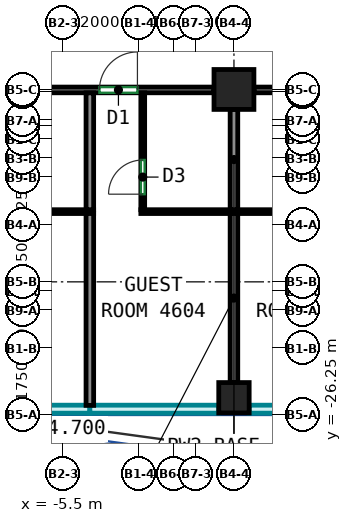
"""IFC4 building model, lengths in metres.
Left out: names, types, materials, properties, quantities, classifications, styles, units other than length and angle.
Written with IfcOpenShell. Run it as: python <this file> out.ifc"""

import sys

from ifc_helpers import new_model, si_unit, direction, frame, frame_2d, origin, origin_2d, place, context, subcontext, project, spatial, rectangle, extrude, source, transform, mapped, element, fill, save


model = new_model("IFC4")
c1 = context("Model", 3, precision=1e-05, world=origin(), true_north=direction((0.0, 1.0)))
c2 = subcontext(c1, "Body", "Model", "MODEL_VIEW")
j1 = project(units=[si_unit("LENGTHUNIT", "METRE"), si_unit("PLANEANGLEUNIT", "RADIAN")], contexts=[c1])
p1 = place(None, origin())
s1 = spatial("IfcSite", under=j1, at=p1, CompositionType="ELEMENT")
p2 = place(p1, origin())
s2 = spatial("IfcBuilding", under=s1, at=p2, CompositionType="ELEMENT")
p3 = place(p2, frame((0.0, 0.0, 192.3)))
s3 = spatial("IfcBuildingStorey", under=s2, at=p3, CompositionType="ELEMENT", Elevation=192.3)
m1 = source(origin(), c2, "Body", "SweptSolid", [
    extrude(rectangle(XDim=0.8, YDim=0.8, at=origin_2d()), origin(), (0.0, 0.0, 1.0), 3.0),
])
p4 = place(p3, frame((-1.0, -25.8, 0.0), z_axis=(0.0, 0.0, 1.0), x_axis=(1.0, 0.0, 0.0)))
e1 = element("IfcColumn", 1, at=p4, inside=s3, PredefinedType="COLUMN", context=c2, shape_type="MappedRepresentation", body=[
    mapped(m1, transform((0.0, 0.0, 0.0))),
])
m2 = source(origin(), c2, "Body", "SweptSolid", [
    extrude(rectangle(XDim=1.05, YDim=1.05, at=origin_2d()), origin(), (0.0, 0.0, 1.0), 3.0),
])
p5 = place(p3, frame((-1.0, -17.688, 0.0), z_axis=(0.0, 0.0, 1.0), x_axis=(1.0, 0.0, 0.0)))
e2 = element("IfcColumn", 2, at=p5, inside=s3, PredefinedType="COLUMN", context=c2, shape_type="MappedRepresentation", body=[
    mapped(m2, transform((0.0, 0.0, 0.0))),
])
p6 = place(p3, frame((-8.058, -17.7, 0.0), z_axis=(0.0, 0.0, 1.0), x_axis=(1.0, 0.0, 0.0)))
e3 = element("IfcWall", 3, at=p6, inside=s3, PredefinedType="PARTITIONING", context=c2, shape_type="SweptSolid", body=[
    extrude(rectangle(XDim=6.533, YDim=0.15, at=frame_2d((3.267, 0.0))), origin(), (0.0, 0.0, 1.0), 2.4),
])
p7 = place(p6, frame((3.518, 0.0, 0.0)))
e4 = element("IfcOpeningElement", 4, at=p7, cuts=e3, PredefinedType="OPENING", context=c2, shape_type="SweptSolid", body=[
    extrude(rectangle(XDim=1.0, YDim=2.1, at=frame_2d((0.5, 1.05))), frame((0.0, 0.085, 0.0), z_axis=(0.0, -1.0, 0.0), x_axis=(1.0, 0.0, 0.0)), (0.0, 0.0, 1.0), 0.17),
])
p8 = place(p3, frame((-0.475, -17.7, 0.0), z_axis=(0.0, 0.0, 1.0), x_axis=(1.0, 0.0, 0.0)))
e5 = element("IfcWall", 5, at=p8, inside=s3, PredefinedType="PARTITIONING", context=c2, shape_type="SweptSolid", body=[
    extrude(rectangle(XDim=6.533, YDim=0.15, at=frame_2d((3.267, 0.0))), origin(), (0.0, 0.0, 1.0), 2.4),
])
p9 = place(p8, frame((2.147, 0.0, 0.0)))
e6 = element("IfcOpeningElement", 6, at=p9, cuts=e5, PredefinedType="OPENING", context=c2, shape_type="SweptSolid", body=[
    extrude(rectangle(XDim=1.0, YDim=2.1, at=frame_2d((0.5, 1.05))), frame((0.0, 0.085, 0.0), z_axis=(0.0, -1.0, 0.0), x_axis=(1.0, 0.0, 0.0)), (0.0, 0.0, 1.0), 0.17),
])
p10 = place(p8, frame((3.468, 0.0, 0.0)))
e7 = element("IfcOpeningElement", 7, at=p10, cuts=e5, PredefinedType="OPENING", context=c2, shape_type="SweptSolid", body=[
    extrude(rectangle(XDim=1.0, YDim=2.1, at=frame_2d((0.5, 1.05))), frame((0.0, 0.085, 0.0), z_axis=(0.0, -1.0, 0.0), x_axis=(1.0, 0.0, 0.0)), (0.0, 0.0, 1.0), 0.17),
])
p11 = place(p3, frame((-7.242, -20.902, 0.0), z_axis=(0.0, 0.0, 1.0), x_axis=(1.0, 0.0, 0.0)))
e8 = element("IfcWall", 8, at=p11, inside=s3, PredefinedType="PARTITIONING", context=c2, shape_type="SweptSolid", body=[
    extrude(rectangle(XDim=2.55, YDim=0.1, at=frame_2d((1.275, 0.0))), origin(), (0.0, 0.0, 1.0), 3.0),
])
p12 = place(p3, frame((-4.792, -26.0, 0.0), z_axis=(0.0, 0.0, 1.0), x_axis=(0.0, 1.0, 0.0)))
e9 = element("IfcWall", 9, at=p12, inside=s3, PredefinedType="PARTITIONING", context=c2, shape_type="SweptSolid", body=[
    extrude(rectangle(XDim=5.048, YDim=0.2, at=frame_2d((2.524, 0.0))), origin(), (0.0, 0.0, 1.0), 3.0),
])
p13 = place(p3, frame((-4.792, -20.852, 0.0), z_axis=(0.0, 0.0, 1.0), x_axis=(0.0, 1.0, 0.0)))
e10 = element("IfcWall", 10, at=p13, inside=s3, PredefinedType="PARTITIONING", context=c2, shape_type="SweptSolid", body=[
    extrude(rectangle(XDim=3.075, YDim=0.2, at=frame_2d((1.538, 0.0))), origin(), (0.0, 0.0, 1.0), 3.0),
])
p14 = place(p3, frame((-3.4, -20.852, 0.0), z_axis=(0.0, 0.0, 1.0), x_axis=(0.0, 1.0, 0.0)))
e11 = element("IfcWall", 11, at=p14, inside=s3, PredefinedType="PARTITIONING", context=c2, shape_type="SweptSolid", body=[
    extrude(rectangle(XDim=3.075, YDim=0.1, at=frame_2d((1.538, 0.0))), origin(), (0.0, 0.0, 1.0), 3.0),
])
p15 = place(p14, frame((0.409, 0.0, 0.0)))
e12 = element("IfcOpeningElement", 12, at=p15, cuts=e11, PredefinedType="OPENING", context=c2, shape_type="SweptSolid", body=[
    extrude(rectangle(XDim=0.9, YDim=2.1, at=frame_2d((0.45, 1.05))), frame((0.0, 0.06, 0.0), z_axis=(0.0, -1.0, 0.0), x_axis=(1.0, 0.0, 0.0)), (0.0, 0.0, 1.0), 0.12),
])
p16 = place(p3, frame((-3.45, -20.902, 0.0), z_axis=(0.0, 0.0, 1.0), x_axis=(1.0, 0.0, 0.0)))
e13 = element("IfcWall", 13, at=p16, inside=s3, PredefinedType="PARTITIONING", context=c2, shape_type="SweptSolid", body=[
    extrude(rectangle(XDim=4.9, YDim=0.1, at=frame_2d((2.45, 0.0))), origin(), (0.0, 0.0, 1.0), 3.0),
])
p17 = place(p3, frame((-1.0, -25.4, 0.0), z_axis=(0.0, 0.0, 1.0), x_axis=(0.0, 1.0, 0.0)))
e14 = element("IfcWall", 14, at=p17, inside=s3, PredefinedType="PARTITIONING", context=c2, shape_type="SweptSolid", body=[
    extrude(rectangle(XDim=4.448, YDim=0.2, at=frame_2d((2.224, 0.0))), origin(), (0.0, 0.0, 1.0), 2.4),
])
p18 = place(p3, frame((-1.0, -20.852, 0.0), z_axis=(0.0, 0.0, 1.0), x_axis=(0.0, 1.0, 0.0)))
e15 = element("IfcWall", 15, at=p18, inside=s3, PredefinedType="PARTITIONING", context=c2, shape_type="SweptSolid", body=[
    extrude(rectangle(XDim=2.64, YDim=0.2, at=frame_2d((1.32, 0.0))), origin(), (0.0, 0.0, 1.0), 2.4),
])
p19 = place(p15, origin())
e16 = element("IfcDoor", 16, at=p19, inside=s3, OperationType="SINGLE_SWING_LEFT", PredefinedType="DOOR", context=c2, shape_type="SweptSolid", body=[
    extrude(rectangle(XDim=0.9, YDim=2.1, at=frame_2d((0.45, 1.05))), frame((0.0, 0.025, 0.0), z_axis=(0.0, -1.0, 0.0), x_axis=(1.0, 0.0, 0.0)), (0.0, 0.0, 1.0), 0.05),
])
fill(e12, e16)
p20 = place(p7, origin())
e17 = element("IfcDoor", 17, at=p20, inside=s3, OperationType="SINGLE_SWING_RIGHT", PredefinedType="DOOR", context=c2, shape_type="SweptSolid", body=[
    extrude(rectangle(XDim=1.0, YDim=2.1, at=frame_2d((0.5, 1.05))), frame((0.0, 0.025, 0.0), z_axis=(0.0, -1.0, 0.0), x_axis=(1.0, 0.0, 0.0)), (0.0, 0.0, 1.0), 0.05),
])
fill(e4, e17)
save(model, sys.argv[1])
